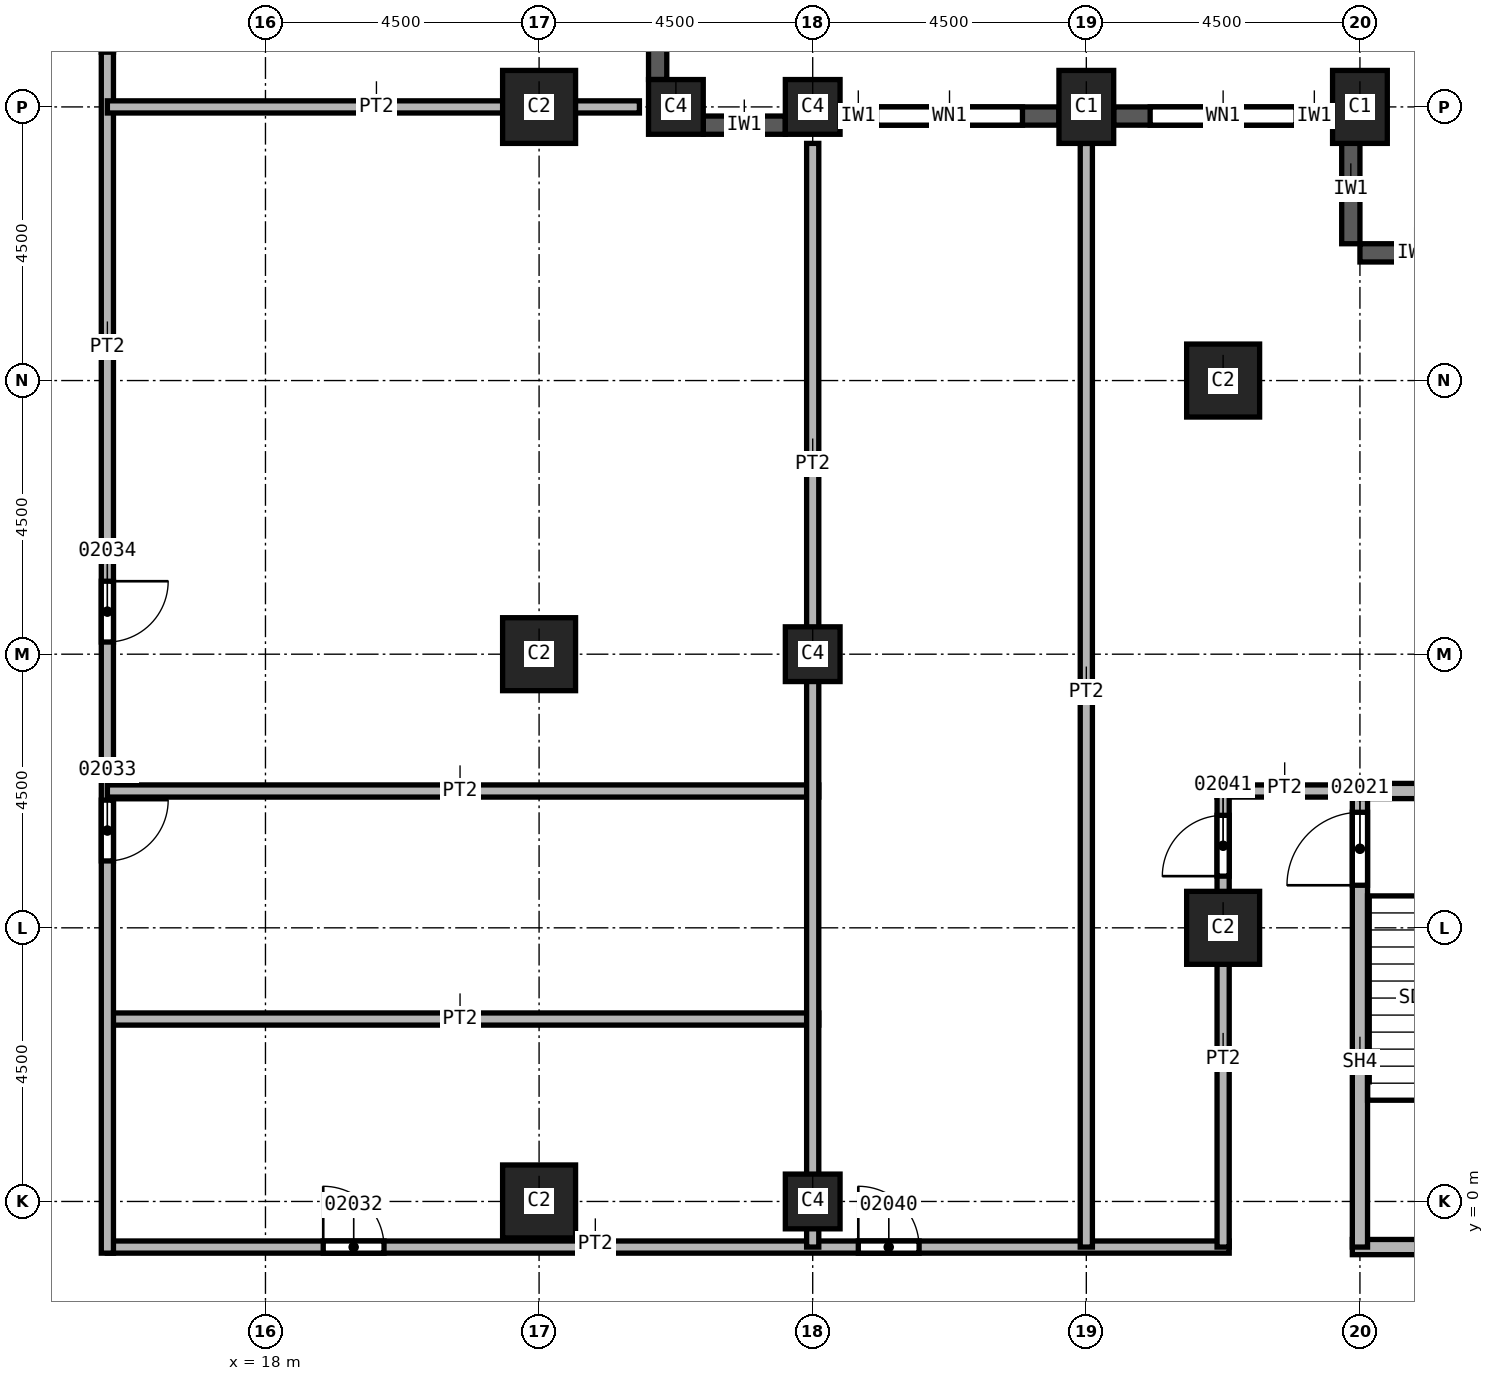
"""IFC4 building model, lengths in metres.
Left out: names, types, materials, properties, quantities, classifications, styles, units other than length and angle.
Written with IfcOpenShell. Run it as: python <this file> out.ifc"""

import sys

from ifc_helpers import new_model, si_unit, direction, frame, frame_2d, origin, origin_2d, place, context, subcontext, project, spatial, rectangle, extrude, element, fill, save


model = new_model("IFC4")
c1 = context("Model", 3, precision=1e-05, world=origin(), true_north=direction((0.0, 1.0)))
c2 = subcontext(c1, "Body", "Model", "MODEL_VIEW")
j1 = project(units=[si_unit("LENGTHUNIT", "METRE"), si_unit("PLANEANGLEUNIT", "RADIAN")], contexts=[c1])
p1 = place(None, origin())
s1 = spatial("IfcSite", under=j1, at=p1, CompositionType="ELEMENT")
p2 = place(p1, origin())
s2 = spatial("IfcBuilding", under=s1, at=p2, CompositionType="ELEMENT")
p3 = place(p2, frame((0.0, 0.0, 80.0)))
s3 = spatial("IfcBuildingStorey", under=s2, at=p3, CompositionType="ELEMENT", Elevation=80.0)
for number, where, z_axis, x_axis in (
    (1, (31.5, 18.0, 0.0), (0.0, 0.0, 1.0), (1.0, 0.0, 0.0)),
    (2, (36.0, 18.0, 0.0), (0.0, 0.0, 1.0), (1.0, 0.0, 0.0)),
):
    element("IfcColumn", number, at=place(p3, frame(where, z_axis=z_axis, x_axis=x_axis)), inside=s3, PredefinedType="COLUMN", context=c2, shape_type="SweptSolid", body=[
        extrude(rectangle(XDim=0.9, YDim=1.2, at=origin_2d()), origin(), (0.0, 0.0, 1.0), 3.7),
    ])
for number, where, z_axis, x_axis in (
    (3, (33.75, 4.5, 0.0), (0.0, 0.0, 1.0), (1.0, 0.0, 0.0)),
    (4, (33.75, 13.5, 0.0), (0.0, 0.0, 1.0), (1.0, 0.0, 0.0)),
    (5, (22.5, 0.0, 0.0), (0.0, 0.0, 1.0), (1.0, 0.0, 0.0)),
    (6, (22.5, 9.0, 0.0), (0.0, 0.0, 1.0), (1.0, 0.0, 0.0)),
    (7, (22.5, 18.0, 0.0), (0.0, 0.0, 1.0), (1.0, 0.0, 0.0)),
):
    element("IfcColumn", number, at=place(p3, frame(where, z_axis=z_axis, x_axis=x_axis)), inside=s3, PredefinedType="COLUMN", context=c2, shape_type="SweptSolid", body=[
        extrude(rectangle(XDim=1.2, YDim=1.2, at=origin_2d()), origin(), (0.0, 0.0, 1.0), 3.7),
    ])
for number, where, z_axis, x_axis in (
    (8, (27.0, 0.0, 0.0), (0.0, 0.0, 1.0), (1.0, 0.0, 0.0)),
    (9, (27.0, 9.0, 0.0), (0.0, 0.0, 1.0), (1.0, 0.0, 0.0)),
    (10, (27.0, 18.0, 0.0), (0.0, 0.0, 1.0), (1.0, 0.0, 0.0)),
    (11, (24.75, 18.0, 0.0), (0.0, 0.0, 1.0), (1.0, 0.0, 0.0)),
):
    element("IfcColumn", number, at=place(p3, frame(where, z_axis=z_axis, x_axis=x_axis)), inside=s3, PredefinedType="COLUMN", context=c2, shape_type="SweptSolid", body=[
        extrude(rectangle(XDim=0.9, YDim=0.9, at=origin_2d()), origin(), (0.0, 0.0, 1.0), 3.7),
    ])
for number, where, z_axis, x_axis in (
    (12, (37.8, 15.6, 0.0), (0.0, 0.0, 1.0), (-1.0, 0.0, 0.0)),
    (13, (35.85, 17.55, 0.0), (0.0, 0.0, 1.0), (0.0, -1.0, 0.0)),
):
    element("IfcWall", number, at=place(p3, frame(where, z_axis=z_axis, x_axis=x_axis)), inside=s3, PredefinedType="SOLIDWALL", context=c2, shape_type="SweptSolid", body=[
        extrude(rectangle(XDim=1.8, YDim=0.3, at=frame_2d((0.9, 0.0))), origin(), (0.0, 0.0, 1.0), 3.1),
    ])
p4 = place(p3, frame((35.55, 17.85, 0.0), z_axis=(0.0, 0.0, 1.0), x_axis=(-1.0, 0.0, 0.0)))
e14 = element("IfcWall", 14, at=p4, inside=s3, PredefinedType="SOLIDWALL", context=c2, shape_type="SweptSolid", body=[
    extrude(rectangle(XDim=3.6, YDim=0.3, at=frame_2d((1.8, 0.0))), origin(), (0.0, 0.0, 1.0), 3.1),
])
p5 = place(p4, frame((0.6, 0.0, 0.8)))
e15 = element("IfcOpeningElement", 15, at=p5, cuts=e14, PredefinedType="OPENING", context=c2, shape_type="SweptSolid", body=[
    extrude(rectangle(XDim=2.4, YDim=1.95, at=frame_2d((1.2, 0.975))), frame((0.0, 0.15, 0.0), z_axis=(0.0, -1.0, 0.0), x_axis=(1.0, 0.0, 0.0)), (0.0, 0.0, 1.0), 0.3),
])
p6 = place(p3, frame((31.05, 17.85, 0.0), z_axis=(0.0, 0.0, 1.0), x_axis=(-1.0, 0.0, 0.0)))
e16 = element("IfcWall", 16, at=p6, inside=s3, PredefinedType="SOLIDWALL", context=c2, shape_type="SweptSolid", body=[
    extrude(rectangle(XDim=3.6, YDim=0.3, at=frame_2d((1.8, 0.0))), origin(), (0.0, 0.0, 1.0), 3.1),
])
p7 = place(p6, frame((0.6, 0.0, 0.8)))
e17 = element("IfcOpeningElement", 17, at=p7, cuts=e16, PredefinedType="OPENING", context=c2, shape_type="SweptSolid", body=[
    extrude(rectangle(XDim=2.4, YDim=1.95, at=frame_2d((1.2, 0.975))), frame((0.0, 0.15, 0.0), z_axis=(0.0, -1.0, 0.0), x_axis=(1.0, 0.0, 0.0)), (0.0, 0.0, 1.0), 0.3),
])
p8 = place(p3, frame((26.55, 17.7, 0.0), z_axis=(0.0, 0.0, 1.0), x_axis=(-1.0, 0.0, 0.0)))
e18 = element("IfcWall", 18, at=p8, inside=s3, PredefinedType="SOLIDWALL", context=c2, shape_type="SweptSolid", body=[
    extrude(rectangle(XDim=1.35, YDim=0.3, at=frame_2d((0.675, 0.0))), origin(), (0.0, 0.0, 1.0), 3.1),
])
p9 = place(p3, frame((24.45, 18.45, 0.0), z_axis=(0.0, 0.0, 1.0), x_axis=(0.0, 1.0, 0.0)))
e19 = element("IfcWall", 19, at=p9, inside=s3, PredefinedType="SOLIDWALL", context=c2, shape_type="SweptSolid", body=[
    extrude(rectangle(XDim=2.5, YDim=0.3, at=frame_2d((1.25, 0.0))), origin(), (0.0, 0.0, 1.0), 3.1),
])
p10 = place(p3, frame((15.4, -0.75, 0.0), z_axis=(0.0, 0.0, 1.0), x_axis=(1.0, 0.0, 0.0)))
e20 = element("IfcWall", 20, at=p10, inside=s3, PredefinedType="PARTITIONING", context=c2, shape_type="SweptSolid", body=[
    extrude(rectangle(XDim=18.45, YDim=0.2, at=frame_2d((9.225, 0.0))), origin(), (0.0, 0.0, 1.0), 3.7),
])
p11 = place(p10, frame((3.55, 0.0, 0.0)))
e21 = element("IfcOpeningElement", 21, at=p11, cuts=e20, PredefinedType="OPENING", context=c2, shape_type="SweptSolid", body=[
    extrude(rectangle(XDim=1.0, YDim=2.1, at=frame_2d((0.5, 1.05))), frame((0.0, 0.1, 0.0), z_axis=(0.0, -1.0, 0.0), x_axis=(1.0, 0.0, 0.0)), (0.0, 0.0, 1.0), 0.2),
])
p12 = place(p10, frame((12.35, 0.0, 0.0)))
e22 = element("IfcOpeningElement", 22, at=p12, cuts=e20, PredefinedType="OPENING", context=c2, shape_type="SweptSolid", body=[
    extrude(rectangle(XDim=1.0, YDim=2.1, at=frame_2d((0.5, 1.05))), frame((0.0, 0.1, 0.0), z_axis=(0.0, -1.0, 0.0), x_axis=(1.0, 0.0, 0.0)), (0.0, 0.0, 1.0), 0.2),
])
p13 = place(p3, frame((15.4, 3.0, 0.0), z_axis=(0.0, 0.0, 1.0), x_axis=(1.0, 0.0, 0.0)))
e23 = element("IfcWall", 23, at=p13, inside=s3, PredefinedType="PARTITIONING", context=c2, shape_type="SweptSolid", body=[
    extrude(rectangle(XDim=11.7, YDim=0.2, at=frame_2d((5.85, 0.0))), origin(), (0.0, 0.0, 1.0), 3.7),
])
p14 = place(p3, frame((15.4, 24.5, 0.0), z_axis=(0.0, 0.0, 1.0), x_axis=(0.0, -1.0, 0.0)))
e24 = element("IfcWall", 24, at=p14, inside=s3, PredefinedType="PARTITIONING", context=c2, shape_type="SweptSolid", body=[
    extrude(rectangle(XDim=25.35, YDim=0.2, at=frame_2d((12.675, 0.0))), origin(), (0.0, 0.0, 1.0), 3.7),
])
p15 = place(p14, frame((17.9, 0.0, 0.0)))
e25 = element("IfcOpeningElement", 25, at=p15, cuts=e24, PredefinedType="OPENING", context=c2, shape_type="SweptSolid", body=[
    extrude(rectangle(XDim=1.0, YDim=2.1, at=frame_2d((0.5, 1.05))), frame((0.0, 0.1, 0.0), z_axis=(0.0, -1.0, 0.0), x_axis=(1.0, 0.0, 0.0)), (0.0, 0.0, 1.0), 0.2),
])
p16 = place(p14, frame((14.3, 0.0, 0.0)))
e26 = element("IfcOpeningElement", 26, at=p16, cuts=e24, PredefinedType="OPENING", context=c2, shape_type="SweptSolid", body=[
    extrude(rectangle(XDim=1.0, YDim=2.1, at=frame_2d((0.5, 1.05))), frame((0.0, 0.1, 0.0), z_axis=(0.0, -1.0, 0.0), x_axis=(1.0, 0.0, 0.0)), (0.0, 0.0, 1.0), 0.2),
])
p17 = place(p14, frame((4.6, 0.0, 0.0)))
e27 = element("IfcOpeningElement", 27, at=p17, cuts=e24, PredefinedType="OPENING", context=c2, shape_type="SweptSolid", body=[
    extrude(rectangle(XDim=1.0, YDim=2.1, at=frame_2d((0.5, 1.05))), frame((0.0, 0.1, 0.0), z_axis=(0.0, -1.0, 0.0), x_axis=(1.0, 0.0, 0.0)), (0.0, 0.0, 1.0), 0.2),
])
p18 = place(p3, frame((15.4, 6.75, 0.0), z_axis=(0.0, 0.0, 1.0), x_axis=(1.0, 0.0, 0.0)))
e28 = element("IfcWall", 28, at=p18, inside=s3, PredefinedType="PARTITIONING", context=c2, shape_type="SweptSolid", body=[
    extrude(rectangle(XDim=11.7, YDim=0.2, at=frame_2d((5.85, 0.0))), origin(), (0.0, 0.0, 1.0), 3.7),
])
p19 = place(p3, frame((15.4, 18.0, 0.0), z_axis=(0.0, 0.0, 1.0), x_axis=(1.0, 0.0, 0.0)))
e29 = element("IfcWall", 29, at=p19, inside=s3, PredefinedType="PARTITIONING", context=c2, shape_type="SweptSolid", body=[
    extrude(rectangle(XDim=8.75, YDim=0.2, at=frame_2d((4.375, 0.0))), origin(), (0.0, 0.0, 1.0), 3.7),
])
for number, where, z_axis, x_axis in (
    (30, (27.0, 17.4, 0.0), (0.0, 0.0, 1.0), (0.0, -1.0, 0.0)),
    (31, (31.5, 17.4, 0.0), (0.0, 0.0, 1.0), (0.0, -1.0, 0.0)),
):
    element("IfcWall", number, at=place(p3, frame(where, z_axis=z_axis, x_axis=x_axis)), inside=s3, PredefinedType="PARTITIONING", context=c2, shape_type="SweptSolid", body=[
        extrude(rectangle(XDim=18.15, YDim=0.2, at=frame_2d((9.075, 0.0))), origin(), (0.0, 0.0, 1.0), 3.7),
    ])
p20 = place(p3, frame((33.65, 6.75, 0.0), z_axis=(0.0, 0.0, 1.0), x_axis=(1.0, 0.0, 0.0)))
e32 = element("IfcWall", 32, at=p20, inside=s3, PredefinedType="PARTITIONING", context=c2, shape_type="SweptSolid", body=[
    extrude(rectangle(XDim=2.35, YDim=0.2, at=frame_2d((1.175, 0.0))), origin(), (0.0, 0.0, 1.0), 3.7),
])
p21 = place(p3, frame((33.75, -0.75, 0.0), z_axis=(0.0, 0.0, 1.0), x_axis=(0.0, 1.0, 0.0)))
e33 = element("IfcWall", 33, at=p21, inside=s3, PredefinedType="PARTITIONING", context=c2, shape_type="SweptSolid", body=[
    extrude(rectangle(XDim=7.5, YDim=0.2, at=frame_2d((3.75, 0.0))), origin(), (0.0, 0.0, 1.0), 3.7),
])
p22 = place(p21, frame((6.1, 0.0, 0.0)))
e34 = element("IfcOpeningElement", 34, at=p22, cuts=e33, PredefinedType="OPENING", context=c2, shape_type="SweptSolid", body=[
    extrude(rectangle(XDim=1.0, YDim=2.1, at=frame_2d((0.5, 1.05))), frame((0.0, 0.1, 0.0), z_axis=(0.0, -1.0, 0.0), x_axis=(1.0, 0.0, 0.0)), (0.0, 0.0, 1.0), 0.2),
])
p23 = place(p3, frame((35.875, -0.75, 0.0), z_axis=(0.0, 0.0, 1.0), x_axis=(1.0, 0.0, 0.0)))
e35 = element("IfcWall", 35, at=p23, inside=s3, PredefinedType="SOLIDWALL", context=c2, shape_type="SweptSolid", body=[
    extrude(rectangle(XDim=4.325, YDim=0.25, at=frame_2d((2.163, 0.0))), origin(), (0.0, 0.0, 1.0), 3.7),
])
p24 = place(p3, frame((36.0, -0.75, 0.0), z_axis=(0.0, 0.0, 1.0), x_axis=(0.0, 1.0, 0.0)))
e36 = element("IfcWall", 36, at=p24, inside=s3, PredefinedType="SOLIDWALL", context=c2, shape_type="SweptSolid", body=[
    extrude(rectangle(XDim=7.625, YDim=0.25, at=frame_2d((3.812, 0.0))), origin(), (0.0, 0.0, 1.0), 3.7),
])
p25 = place(p24, frame((5.95, 0.0, 0.0)))
e37 = element("IfcOpeningElement", 37, at=p25, cuts=e36, PredefinedType="OPENING", context=c2, shape_type="SweptSolid", body=[
    extrude(rectangle(XDim=1.2, YDim=2.1, at=frame_2d((0.6, 1.05))), frame((0.0, 0.125, 0.0), z_axis=(0.0, -1.0, 0.0), x_axis=(1.0, 0.0, 0.0)), (0.0, 0.0, 1.0), 0.25),
])
p26 = place(p3, frame((36.0, 6.75, 0.0), z_axis=(0.0, 0.0, 1.0), x_axis=(1.0, 0.0, 0.0)))
e38 = element("IfcWall", 38, at=p26, inside=s3, PredefinedType="SOLIDWALL", context=c2, shape_type="SweptSolid", body=[
    extrude(rectangle(XDim=4.2, YDim=0.25, at=frame_2d((2.1, 0.0))), origin(), (0.0, 0.0, 1.0), 3.7),
])
p27 = place(p5, origin())
e39 = element("IfcWindow", 39, at=p27, inside=s3, PartitioningType="SINGLE_PANEL", PredefinedType="WINDOW", context=c2, shape_type="SweptSolid", body=[
    extrude(rectangle(XDim=2.4, YDim=1.95, at=frame_2d((1.2, 0.975))), frame((0.0, 0.03, 0.0), z_axis=(0.0, -1.0, 0.0), x_axis=(1.0, 0.0, 0.0)), (0.0, 0.0, 1.0), 0.06),
])
fill(e15, e39)
p28 = place(p7, origin())
e40 = element("IfcWindow", 40, at=p28, inside=s3, PartitioningType="SINGLE_PANEL", PredefinedType="WINDOW", context=c2, shape_type="SweptSolid", body=[
    extrude(rectangle(XDim=2.4, YDim=1.95, at=frame_2d((1.2, 0.975))), frame((0.0, 0.03, 0.0), z_axis=(0.0, -1.0, 0.0), x_axis=(1.0, 0.0, 0.0)), (0.0, 0.0, 1.0), 0.06),
])
fill(e17, e40)
p29 = place(p25, origin())
e41 = element("IfcDoor", 41, at=p29, inside=s3, OperationType="SINGLE_SWING_RIGHT", PredefinedType="DOOR", context=c2, shape_type="SweptSolid", body=[
    extrude(rectangle(XDim=1.2, YDim=2.1, at=frame_2d((0.6, 1.05))), frame((0.0, 0.025, 0.0), z_axis=(0.0, -1.0, 0.0), x_axis=(1.0, 0.0, 0.0)), (0.0, 0.0, 1.0), 0.05),
])
fill(e37, e41)
p30 = place(p11, origin())
e42 = element("IfcDoor", 42, at=p30, inside=s3, OperationType="SINGLE_SWING_LEFT", PredefinedType="DOOR", context=c2, shape_type="SweptSolid", body=[
    extrude(rectangle(XDim=1.0, YDim=2.1, at=frame_2d((0.5, 1.05))), frame((0.0, 0.025, 0.0), z_axis=(0.0, -1.0, 0.0), x_axis=(1.0, 0.0, 0.0)), (0.0, 0.0, 1.0), 0.05),
])
fill(e21, e42)
p31 = place(p15, origin())
e43 = element("IfcDoor", 43, at=p31, inside=s3, OperationType="SINGLE_SWING_RIGHT", PredefinedType="DOOR", context=c2, shape_type="SweptSolid", body=[
    extrude(rectangle(XDim=1.0, YDim=2.1, at=frame_2d((0.5, 1.05))), frame((0.0, 0.025, 0.0), z_axis=(0.0, -1.0, 0.0), x_axis=(1.0, 0.0, 0.0)), (0.0, 0.0, 1.0), 0.05),
])
fill(e25, e43)
p32 = place(p16, origin())
e44 = element("IfcDoor", 44, at=p32, inside=s3, OperationType="SINGLE_SWING_LEFT", PredefinedType="DOOR", context=c2, shape_type="SweptSolid", body=[
    extrude(rectangle(XDim=1.0, YDim=2.1, at=frame_2d((0.5, 1.05))), frame((0.0, 0.025, 0.0), z_axis=(0.0, -1.0, 0.0), x_axis=(1.0, 0.0, 0.0)), (0.0, 0.0, 1.0), 0.05),
])
fill(e26, e44)
p33 = place(p12, origin())
e45 = element("IfcDoor", 45, at=p33, inside=s3, OperationType="SINGLE_SWING_LEFT", PredefinedType="DOOR", context=c2, shape_type="SweptSolid", body=[
    extrude(rectangle(XDim=1.0, YDim=2.1, at=frame_2d((0.5, 1.05))), frame((0.0, 0.025, 0.0), z_axis=(0.0, -1.0, 0.0), x_axis=(1.0, 0.0, 0.0)), (0.0, 0.0, 1.0), 0.05),
])
fill(e22, e45)
p34 = place(p22, origin())
e46 = element("IfcDoor", 46, at=p34, inside=s3, OperationType="SINGLE_SWING_RIGHT", PredefinedType="DOOR", context=c2, shape_type="SweptSolid", body=[
    extrude(rectangle(XDim=1.0, YDim=2.1, at=frame_2d((0.5, 1.05))), frame((0.0, 0.025, 0.0), z_axis=(0.0, -1.0, 0.0), x_axis=(1.0, 0.0, 0.0)), (0.0, 0.0, 1.0), 0.05),
])
fill(e34, e46)
save(model, sys.argv[1])
